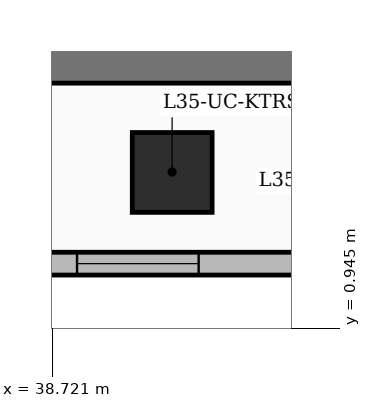
"""IFC4 building model, lengths in metres.
Left out: names, types, materials, properties, quantities, classifications, styles, units other than length and angle.
Written with IfcOpenShell. Run it as: python <this file> out.ifc"""

import sys

from ifc_helpers import new_model, si_unit, direction, frame, frame_2d, origin, origin_2d, place, context, subcontext, project, spatial, rectangle, extrude, element, fill, save


model = new_model("IFC4")
c1 = context("Model", 3, precision=1e-05, world=origin(), true_north=direction((0.0, 1.0)))
c2 = subcontext(c1, "Body", "Model", "MODEL_VIEW")
j1 = project(units=[si_unit("LENGTHUNIT", "METRE"), si_unit("PLANEANGLEUNIT", "RADIAN")], contexts=[c1])
p1 = place(None, origin())
s1 = spatial("IfcSite", under=j1, at=p1, CompositionType="ELEMENT")
p2 = place(p1, origin())
s2 = spatial("IfcBuilding", under=s1, at=p2, CompositionType="ELEMENT")
p3 = place(p2, frame((0.0, 0.0, 139.2)))
s3 = spatial("IfcBuildingStorey", under=s2, at=p3, CompositionType="ELEMENT", Elevation=139.2)
p4 = place(p3, frame((35.75, 4.55, 0.0), z_axis=(0.0, 0.0, 1.0), x_axis=(1.0, 0.0, 0.0)))
e1 = element("IfcWall", 1, at=p4, inside=s3, PredefinedType="SHEAR", context=c2, shape_type="SweptSolid", body=[
    extrude(rectangle(XDim=10.7, YDim=0.75, at=frame_2d((5.35, 0.0))), origin(), (0.0, 0.0, 1.0), 3.6),
])
p5 = place(p3, frame((40.296, 3.0, 0.0), z_axis=(0.0, 0.0, 1.0), x_axis=(1.0, 0.0, 0.0)))
e2 = element("IfcColumn", 2, at=p5, inside=s3, PredefinedType="COLUMN", context=c2, shape_type="SweptSolid", body=[
    extrude(rectangle(XDim=1.05, YDim=1.05, at=origin_2d()), origin(), (0.0, 0.0, 1.0), 3.6),
])
p6 = place(p3, frame((44.494, 1.8, 0.0), z_axis=(0.0, 0.0, 1.0), x_axis=(-1.0, 0.0, 0.0)))
e3 = element("IfcWall", 3, at=p6, inside=s3, PredefinedType="SOLIDWALL", context=c2, shape_type="SweptSolid", body=[
    extrude(rectangle(XDim=6.723, YDim=0.3, at=frame_2d((3.361, 0.0))), origin(), (0.0, 0.0, 1.0), 3.35),
])
p7 = place(p6, frame((0.85, 0.0, 0.55)))
e4 = element("IfcOpeningElement", 4, at=p7, cuts=e3, PredefinedType="OPENING", context=c2, shape_type="SweptSolid", body=[
    extrude(rectangle(XDim=1.6, YDim=2.2, at=frame_2d((0.8, 1.1))), frame((0.0, 0.16, 0.0), z_axis=(0.0, -1.0, 0.0), x_axis=(1.0, 0.0, 0.0)), (0.0, 0.0, 1.0), 0.32),
])
p8 = place(p6, frame((3.85, 0.0, 0.55)))
e5 = element("IfcOpeningElement", 5, at=p8, cuts=e3, PredefinedType="OPENING", context=c2, shape_type="SweptSolid", body=[
    extrude(rectangle(XDim=1.6, YDim=2.2, at=frame_2d((0.8, 1.1))), frame((0.0, 0.16, 0.0), z_axis=(0.0, -1.0, 0.0), x_axis=(1.0, 0.0, 0.0)), (0.0, 0.0, 1.0), 0.32),
])
p9 = place(p8, origin())
e6 = element("IfcWindow", 6, at=p9, inside=s3, PartitioningType="SINGLE_PANEL", PredefinedType="WINDOW", context=c2, shape_type="SweptSolid", body=[
    extrude(rectangle(XDim=1.6, YDim=2.2, at=frame_2d((0.8, 1.1))), frame((0.0, 0.03, 0.0), z_axis=(0.0, -1.0, 0.0), x_axis=(1.0, 0.0, 0.0)), (0.0, 0.0, 1.0), 0.06),
])
fill(e5, e6)
save(model, sys.argv[1])
